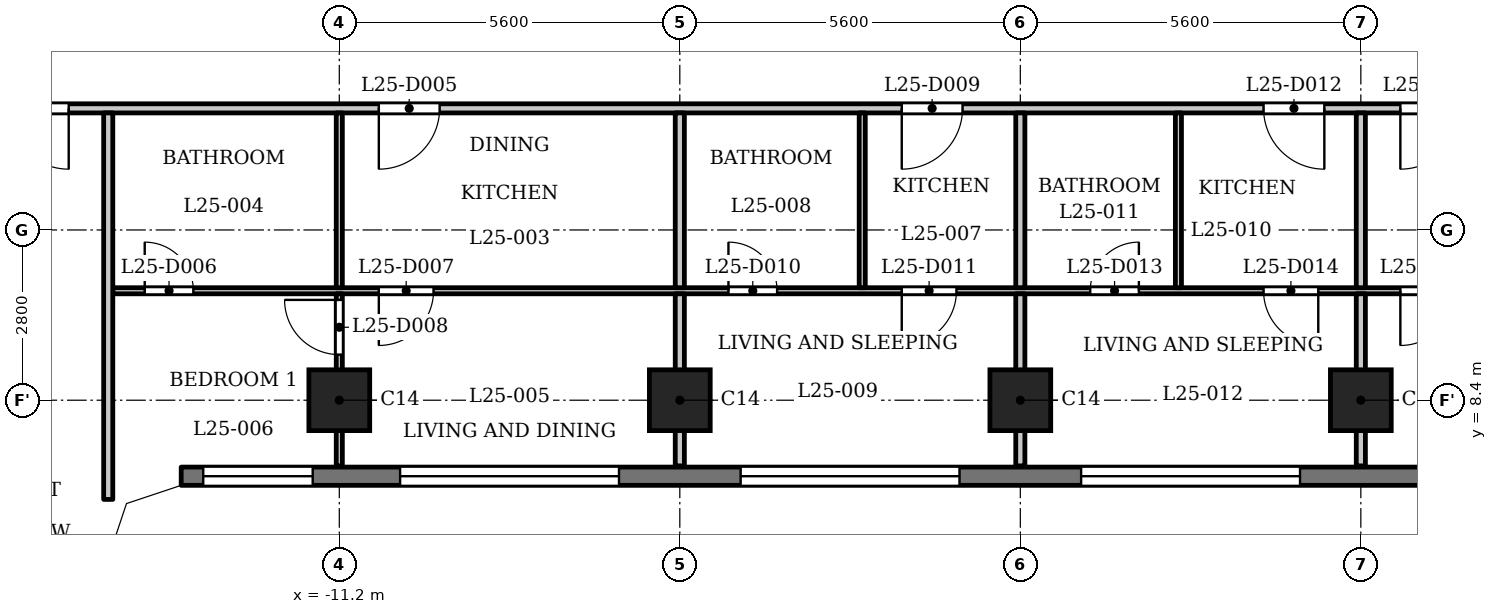
"""IFC4 building model, lengths in metres.
Left out: names, types, materials, properties, quantities, classifications, styles, units other than length and angle.
Written with IfcOpenShell. Run it as: python <this file> out.ifc"""

import sys

from ifc_helpers import new_model, si_unit, direction, frame, frame_2d, origin, origin_2d, place, context, subcontext, project, spatial, polyline, rectangle, outline, extrude, element, fill, save


model = new_model("IFC4")
c1 = context("Model", 3, precision=1e-05, world=origin(), true_north=direction((0.0, 1.0)))
c2 = subcontext(c1, "Body", "Model", "MODEL_VIEW")
j1 = project(units=[si_unit("LENGTHUNIT", "METRE"), si_unit("PLANEANGLEUNIT", "RADIAN")], contexts=[c1])
p1 = place(None, origin())
s1 = spatial("IfcSite", under=j1, at=p1, CompositionType="ELEMENT")
p2 = place(p1, origin())
s2 = spatial("IfcBuilding", under=s1, at=p2, CompositionType="ELEMENT")
p3 = place(p2, frame((0.0, 0.0, 100.8)))
s3 = spatial("IfcBuildingStorey", under=s2, at=p3, CompositionType="ELEMENT", Elevation=100.8)
for number, where, z_axis, x_axis in (
    (1, (-11.2, 8.4, 0.0), (0.0, 0.0, 1.0), (1.0, 0.0, 0.0)),
    (2, (-5.6, 8.4, 0.0), (0.0, 0.0, 1.0), (1.0, 0.0, 0.0)),
    (3, (0.0, 8.4, 0.0), (0.0, 0.0, 1.0), (1.0, 0.0, 0.0)),
    (4, (5.6, 8.4, 0.0), (0.0, 0.0, 1.0), (1.0, 0.0, 0.0)),
):
    element("IfcColumn", number, at=place(p3, frame(where, z_axis=z_axis, x_axis=x_axis)), inside=s3, PredefinedType="COLUMN", context=c2, shape_type="SweptSolid", body=[
        extrude(rectangle(XDim=1.0, YDim=1.0, at=origin_2d()), origin(), (0.0, 0.0, 1.0), 3.5),
    ])
p4 = place(p3, frame((-13.8, 7.15, 0.0), z_axis=(0.0, 0.0, 1.0), x_axis=(1.0, 0.0, 0.0)))
e5 = element("IfcWall", 5, at=p4, inside=s3, PredefinedType="SOLIDWALL", context=c2, shape_type="SweptSolid", body=[
    extrude(rectangle(XDim=27.6, YDim=0.3, at=frame_2d((13.8, 0.0))), origin(), (0.0, 0.0, 1.0), 3.2),
])
p5 = place(p4, frame((0.363, 0.0, 0.9)))
e6 = element("IfcOpeningElement", 6, at=p5, cuts=e5, PredefinedType="OPENING", context=c2, shape_type="SweptSolid", body=[
    extrude(rectangle(XDim=1.8, YDim=1.25, at=frame_2d((0.9, 0.625))), frame((0.0, 0.16, 0.0), z_axis=(0.0, -1.0, 0.0), x_axis=(1.0, 0.0, 0.0)), (0.0, 0.0, 1.0), 0.32),
])
p6 = place(p4, frame((3.6, 0.0, 1.2)))
e7 = element("IfcOpeningElement", 7, at=p6, cuts=e5, PredefinedType="OPENING", context=c2, shape_type="SweptSolid", body=[
    extrude(rectangle(XDim=3.6, YDim=0.95, at=frame_2d((1.8, 0.475))), frame((0.0, 0.16, 0.0), z_axis=(0.0, -1.0, 0.0), x_axis=(1.0, 0.0, 0.0)), (0.0, 0.0, 1.0), 0.32),
])
p7 = place(p4, frame((9.2, 0.0, 1.2)))
e8 = element("IfcOpeningElement", 8, at=p7, cuts=e5, PredefinedType="OPENING", context=c2, shape_type="SweptSolid", body=[
    extrude(rectangle(XDim=3.6, YDim=0.95, at=frame_2d((1.8, 0.475))), frame((0.0, 0.16, 0.0), z_axis=(0.0, -1.0, 0.0), x_axis=(1.0, 0.0, 0.0)), (0.0, 0.0, 1.0), 0.32),
])
p8 = place(p4, frame((14.8, 0.0, 1.2)))
e9 = element("IfcOpeningElement", 9, at=p8, cuts=e5, PredefinedType="OPENING", context=c2, shape_type="SweptSolid", body=[
    extrude(rectangle(XDim=3.6, YDim=0.95, at=frame_2d((1.8, 0.475))), frame((0.0, 0.16, 0.0), z_axis=(0.0, -1.0, 0.0), x_axis=(1.0, 0.0, 0.0)), (0.0, 0.0, 1.0), 0.32),
])
p9 = place(p4, frame((20.4, 0.0, 1.2)))
e10 = element("IfcOpeningElement", 10, at=p9, cuts=e5, PredefinedType="OPENING", context=c2, shape_type="SweptSolid", body=[
    extrude(rectangle(XDim=3.6, YDim=0.95, at=frame_2d((1.8, 0.475))), frame((0.0, 0.16, 0.0), z_axis=(0.0, -1.0, 0.0), x_axis=(1.0, 0.0, 0.0)), (0.0, 0.0, 1.0), 0.32),
])
p10 = place(p4, frame((25.438, 0.0, 0.9)))
e11 = element("IfcOpeningElement", 11, at=p10, cuts=e5, PredefinedType="OPENING", context=c2, shape_type="SweptSolid", body=[
    extrude(rectangle(XDim=1.8, YDim=1.25, at=frame_2d((0.9, 0.625))), frame((0.0, 0.16, 0.0), z_axis=(0.0, -1.0, 0.0), x_axis=(1.0, 0.0, 0.0)), (0.0, 0.0, 1.0), 0.32),
])
p11 = place(p3, frame((-14.925, 10.2, 0.0), z_axis=(0.0, 0.0, 1.0), x_axis=(1.0, 0.0, 0.0)))
e12 = element("IfcWall", 12, at=p11, inside=s3, PredefinedType="PARTITIONING", context=c2, shape_type="SweptSolid", body=[
    extrude(rectangle(XDim=29.85, YDim=0.1, at=frame_2d((14.925, 0.0))), origin(), (0.0, 0.0, 1.0), 3.2),
])
p12 = place(p11, frame((0.525, 0.0, 0.0)))
e13 = element("IfcOpeningElement", 13, at=p12, cuts=e12, PredefinedType="OPENING", context=c2, shape_type="SweptSolid", body=[
    extrude(rectangle(XDim=0.8, YDim=2.1, at=frame_2d((0.4, 1.05))), frame((0.0, 0.06, 0.0), z_axis=(0.0, -1.0, 0.0), x_axis=(1.0, 0.0, 0.0)), (0.0, 0.0, 1.0), 0.12),
])
p13 = place(p11, frame((4.375, 0.0, 0.0)))
e14 = element("IfcOpeningElement", 14, at=p13, cuts=e12, PredefinedType="OPENING", context=c2, shape_type="SweptSolid", body=[
    extrude(rectangle(XDim=0.9, YDim=2.1, at=frame_2d((0.45, 1.05))), frame((0.0, 0.06, 0.0), z_axis=(0.0, -1.0, 0.0), x_axis=(1.0, 0.0, 0.0)), (0.0, 0.0, 1.0), 0.12),
])
p14 = place(p11, frame((10.125, 0.0, 0.0)))
e15 = element("IfcOpeningElement", 15, at=p14, cuts=e12, PredefinedType="OPENING", context=c2, shape_type="SweptSolid", body=[
    extrude(rectangle(XDim=0.8, YDim=2.1, at=frame_2d((0.4, 1.05))), frame((0.0, 0.06, 0.0), z_axis=(0.0, -1.0, 0.0), x_axis=(1.0, 0.0, 0.0)), (0.0, 0.0, 1.0), 0.12),
])
p15 = place(p11, frame((12.975, 0.0, 0.0)))
e16 = element("IfcOpeningElement", 16, at=p15, cuts=e12, PredefinedType="OPENING", context=c2, shape_type="SweptSolid", body=[
    extrude(rectangle(XDim=0.9, YDim=2.1, at=frame_2d((0.45, 1.05))), frame((0.0, 0.06, 0.0), z_axis=(0.0, -1.0, 0.0), x_axis=(1.0, 0.0, 0.0)), (0.0, 0.0, 1.0), 0.12),
])
p16 = place(p11, frame((16.075, 0.0, 0.0)))
e17 = element("IfcOpeningElement", 17, at=p16, cuts=e12, PredefinedType="OPENING", context=c2, shape_type="SweptSolid", body=[
    extrude(rectangle(XDim=0.8, YDim=2.1, at=frame_2d((0.4, 1.05))), frame((0.0, 0.06, 0.0), z_axis=(0.0, -1.0, 0.0), x_axis=(1.0, 0.0, 0.0)), (0.0, 0.0, 1.0), 0.12),
])
p17 = place(p11, frame((18.925, 0.0, 0.0)))
e18 = element("IfcOpeningElement", 18, at=p17, cuts=e12, PredefinedType="OPENING", context=c2, shape_type="SweptSolid", body=[
    extrude(rectangle(XDim=0.9, YDim=2.1, at=frame_2d((0.45, 1.05))), frame((0.0, 0.06, 0.0), z_axis=(0.0, -1.0, 0.0), x_axis=(1.0, 0.0, 0.0)), (0.0, 0.0, 1.0), 0.12),
])
p18 = place(p11, frame((26.975, 0.0, 0.0)))
e19 = element("IfcOpeningElement", 19, at=p18, cuts=e12, PredefinedType="OPENING", context=c2, shape_type="SweptSolid", body=[
    extrude(rectangle(XDim=0.8, YDim=2.1, at=frame_2d((0.4, 1.05))), frame((0.0, 0.06, 0.0), z_axis=(0.0, -1.0, 0.0), x_axis=(1.0, 0.0, 0.0)), (0.0, 0.0, 1.0), 0.12),
])
p19 = place(p11, frame((21.175, 0.0, 0.0)))
e20 = element("IfcOpeningElement", 20, at=p19, cuts=e12, PredefinedType="OPENING", context=c2, shape_type="SweptSolid", body=[
    extrude(rectangle(XDim=0.9, YDim=2.1, at=frame_2d((0.45, 1.05))), frame((0.0, 0.06, 0.0), z_axis=(0.0, -1.0, 0.0), x_axis=(1.0, 0.0, 0.0)), (0.0, 0.0, 1.0), 0.12),
])
p20 = place(p3, frame((-17.4, 13.2, 0.0), z_axis=(0.0, 0.0, 1.0), x_axis=(1.0, 0.0, 0.0)))
e21 = element("IfcWall", 21, at=p20, inside=s3, PredefinedType="PARTITIONING", context=c2, shape_type="SweptSolid", body=[
    extrude(rectangle(XDim=34.8, YDim=0.15, at=frame_2d((17.4, 0.0))), origin(), (0.0, 0.0, 1.0), 3.2),
])
p21 = place(p20, frame((0.75, 0.0, 0.0)))
e22 = element("IfcOpeningElement", 22, at=p21, cuts=e21, PredefinedType="OPENING", context=c2, shape_type="SweptSolid", body=[
    extrude(rectangle(XDim=1.0, YDim=2.1, at=frame_2d((0.5, 1.05))), frame((0.0, 0.085, 0.0), z_axis=(0.0, -1.0, 0.0), x_axis=(1.0, 0.0, 0.0)), (0.0, 0.0, 1.0), 0.17),
])
p22 = place(p20, frame((33.15, 0.0, 0.0)))
e23 = element("IfcOpeningElement", 23, at=p22, cuts=e21, PredefinedType="OPENING", context=c2, shape_type="SweptSolid", body=[
    extrude(rectangle(XDim=1.0, YDim=2.1, at=frame_2d((0.5, 1.05))), frame((0.0, 0.085, 0.0), z_axis=(0.0, -1.0, 0.0), x_axis=(1.0, 0.0, 0.0)), (0.0, 0.0, 1.0), 0.17),
])
p23 = place(p20, frame((6.85, 0.0, 0.0)))
e24 = element("IfcOpeningElement", 24, at=p23, cuts=e21, PredefinedType="OPENING", context=c2, shape_type="SweptSolid", body=[
    extrude(rectangle(XDim=1.0, YDim=2.1, at=frame_2d((0.5, 1.05))), frame((0.0, 0.085, 0.0), z_axis=(0.0, -1.0, 0.0), x_axis=(1.0, 0.0, 0.0)), (0.0, 0.0, 1.0), 0.17),
])
p24 = place(p20, frame((15.45, 0.0, 0.0)))
e25 = element("IfcOpeningElement", 25, at=p24, cuts=e21, PredefinedType="OPENING", context=c2, shape_type="SweptSolid", body=[
    extrude(rectangle(XDim=1.0, YDim=2.1, at=frame_2d((0.5, 1.05))), frame((0.0, 0.085, 0.0), z_axis=(0.0, -1.0, 0.0), x_axis=(1.0, 0.0, 0.0)), (0.0, 0.0, 1.0), 0.17),
])
p25 = place(p20, frame((21.4, 0.0, 0.0)))
e26 = element("IfcOpeningElement", 26, at=p25, cuts=e21, PredefinedType="OPENING", context=c2, shape_type="SweptSolid", body=[
    extrude(rectangle(XDim=1.0, YDim=2.1, at=frame_2d((0.5, 1.05))), frame((0.0, 0.085, 0.0), z_axis=(0.0, -1.0, 0.0), x_axis=(1.0, 0.0, 0.0)), (0.0, 0.0, 1.0), 0.17),
])
p26 = place(p20, frame((23.65, 0.0, 0.0)))
e27 = element("IfcOpeningElement", 27, at=p26, cuts=e21, PredefinedType="OPENING", context=c2, shape_type="SweptSolid", body=[
    extrude(rectangle(XDim=1.0, YDim=2.1, at=frame_2d((0.5, 1.05))), frame((0.0, 0.085, 0.0), z_axis=(0.0, -1.0, 0.0), x_axis=(1.0, 0.0, 0.0)), (0.0, 0.0, 1.0), 0.17),
])
p27 = place(p3, frame((-15.0, 6.769, 0.0), z_axis=(0.0, 0.0, 1.0), x_axis=(0.0, 1.0, 0.0)))
e28 = element("IfcWall", 28, at=p27, inside=s3, PredefinedType="PARTITIONING", context=c2, shape_type="SweptSolid", body=[
    extrude(rectangle(XDim=6.356, YDim=0.15, at=frame_2d((3.178, 0.0))), origin(), (0.0, 0.0, 1.0), 3.2),
])
p28 = place(p3, frame((-11.2, 7.32, 0.0), z_axis=(0.0, 0.0, 1.0), x_axis=(0.0, 1.0, 0.0)))
e29 = element("IfcWall", 29, at=p28, inside=s3, PredefinedType="PARTITIONING", context=c2, shape_type="SweptSolid", body=[
    extrude(rectangle(XDim=2.83, YDim=0.1, at=frame_2d((1.415, 0.0))), origin(), (0.0, 0.0, 1.0), 3.2),
])
p29 = place(p28, frame((1.83, 0.0, 0.0)))
e30 = element("IfcOpeningElement", 30, at=p29, cuts=e29, PredefinedType="OPENING", context=c2, shape_type="SweptSolid", body=[
    extrude(rectangle(XDim=0.9, YDim=2.1, at=frame_2d((0.45, 1.05))), frame((0.0, 0.06, 0.0), z_axis=(0.0, -1.0, 0.0), x_axis=(1.0, 0.0, 0.0)), (0.0, 0.0, 1.0), 0.12),
])
p30 = place(p3, frame((-11.2, 10.25, 0.0), z_axis=(0.0, 0.0, 1.0), x_axis=(0.0, 1.0, 0.0)))
e31 = element("IfcWall", 31, at=p30, inside=s3, PredefinedType="PARTITIONING", context=c2, shape_type="SweptSolid", body=[
    extrude(rectangle(XDim=2.875, YDim=0.1, at=frame_2d((1.438, 0.0))), origin(), (0.0, 0.0, 1.0), 3.2),
])
p31 = place(p3, frame((-5.6, 7.32, 0.0), z_axis=(0.0, 0.0, 1.0), x_axis=(0.0, 1.0, 0.0)))
e32 = element("IfcWall", 32, at=p31, inside=s3, PredefinedType="PARTITIONING", context=c2, shape_type="SweptSolid", body=[
    extrude(rectangle(XDim=2.83, YDim=0.15, at=frame_2d((1.415, 0.0))), origin(), (0.0, 0.0, 1.0), 3.2),
])
p32 = place(p3, frame((-5.6, 10.25, 0.0), z_axis=(0.0, 0.0, 1.0), x_axis=(0.0, 1.0, 0.0)))
e33 = element("IfcWall", 33, at=p32, inside=s3, PredefinedType="PARTITIONING", context=c2, shape_type="SweptSolid", body=[
    extrude(rectangle(XDim=2.875, YDim=0.15, at=frame_2d((1.438, 0.0))), origin(), (0.0, 0.0, 1.0), 3.2),
])
p33 = place(p3, frame((-2.6, 10.25, 0.0), z_axis=(0.0, 0.0, 1.0), x_axis=(0.0, 1.0, 0.0)))
e34 = element("IfcWall", 34, at=p33, inside=s3, PredefinedType="PARTITIONING", context=c2, shape_type="SweptSolid", body=[
    extrude(rectangle(XDim=2.875, YDim=0.1, at=frame_2d((1.438, 0.0))), origin(), (0.0, 0.0, 1.0), 3.2),
])
p34 = place(p3, frame((0.0, 7.32, 0.0), z_axis=(0.0, 0.0, 1.0), x_axis=(0.0, 1.0, 0.0)))
e35 = element("IfcWall", 35, at=p34, inside=s3, PredefinedType="PARTITIONING", context=c2, shape_type="SweptSolid", body=[
    extrude(rectangle(XDim=2.83, YDim=0.15, at=frame_2d((1.415, 0.0))), origin(), (0.0, 0.0, 1.0), 3.2),
])
p35 = place(p3, frame((0.0, 10.25, 0.0), z_axis=(0.0, 0.0, 1.0), x_axis=(0.0, 1.0, 0.0)))
e36 = element("IfcWall", 36, at=p35, inside=s3, PredefinedType="PARTITIONING", context=c2, shape_type="SweptSolid", body=[
    extrude(rectangle(XDim=2.875, YDim=0.15, at=frame_2d((1.438, 0.0))), origin(), (0.0, 0.0, 1.0), 3.2),
])
p36 = place(p3, frame((2.6, 10.25, 0.0), z_axis=(0.0, 0.0, 1.0), x_axis=(0.0, 1.0, 0.0)))
e37 = element("IfcWall", 37, at=p36, inside=s3, PredefinedType="PARTITIONING", context=c2, shape_type="SweptSolid", body=[
    extrude(rectangle(XDim=2.875, YDim=0.1, at=frame_2d((1.438, 0.0))), origin(), (0.0, 0.0, 1.0), 3.2),
])
p37 = place(p3, frame((5.6, 7.32, 0.0), z_axis=(0.0, 0.0, 1.0), x_axis=(0.0, 1.0, 0.0)))
e38 = element("IfcWall", 38, at=p37, inside=s3, PredefinedType="PARTITIONING", context=c2, shape_type="SweptSolid", body=[
    extrude(rectangle(XDim=2.83, YDim=0.15, at=frame_2d((1.415, 0.0))), origin(), (0.0, 0.0, 1.0), 3.2),
])
p38 = place(p3, frame((5.6, 10.25, 0.0), z_axis=(0.0, 0.0, 1.0), x_axis=(0.0, 1.0, 0.0)))
e39 = element("IfcWall", 39, at=p38, inside=s3, PredefinedType="PARTITIONING", context=c2, shape_type="SweptSolid", body=[
    extrude(rectangle(XDim=2.875, YDim=0.15, at=frame_2d((1.438, 0.0))), origin(), (0.0, 0.0, 1.0), 3.2),
])
p39 = place(p3, origin())
e40 = element("IfcWall", 40, at=p39, inside=s3, PredefinedType="SOLIDWALL", context=c2, shape_type="SweptSolid", body=[
    extrude(outline(polyline([(-13.849, 7.3), (-14.937, 6.937), (-15.3, 5.849), (-15.3, 5.8), (-15.0, 5.8), (-14.7, 6.7), (-13.8, 7.0), (-13.8, 7.3), (-13.849, 7.3)])), origin(), (0.0, 0.0, 1.0), 3.2),
])
p40 = place(p21, origin())
e41 = element("IfcDoor", 41, at=p40, inside=s3, OperationType="SINGLE_SWING_RIGHT", PredefinedType="DOOR", context=c2, shape_type="SweptSolid", body=[
    extrude(rectangle(XDim=1.0, YDim=2.1, at=frame_2d((0.5, 1.05))), frame((0.0, 0.025, 0.0), z_axis=(0.0, -1.0, 0.0), x_axis=(1.0, 0.0, 0.0)), (0.0, 0.0, 1.0), 0.05),
])
fill(e22, e41)
p41 = place(p23, origin())
e42 = element("IfcDoor", 42, at=p41, inside=s3, OperationType="SINGLE_SWING_LEFT", PredefinedType="DOOR", context=c2, shape_type="SweptSolid", body=[
    extrude(rectangle(XDim=1.0, YDim=2.1, at=frame_2d((0.5, 1.05))), frame((0.0, 0.025, 0.0), z_axis=(0.0, -1.0, 0.0), x_axis=(1.0, 0.0, 0.0)), (0.0, 0.0, 1.0), 0.05),
])
fill(e24, e42)
p42 = place(p12, origin())
e43 = element("IfcDoor", 43, at=p42, inside=s3, OperationType="SINGLE_SWING_RIGHT", PredefinedType="DOOR", context=c2, shape_type="SweptSolid", body=[
    extrude(rectangle(XDim=0.8, YDim=2.1, at=frame_2d((0.4, 1.05))), frame((0.0, 0.025, 0.0), z_axis=(0.0, -1.0, 0.0), x_axis=(1.0, 0.0, 0.0)), (0.0, 0.0, 1.0), 0.05),
])
fill(e13, e43)
p43 = place(p13, origin())
e44 = element("IfcDoor", 44, at=p43, inside=s3, OperationType="SINGLE_SWING_LEFT", PredefinedType="DOOR", context=c2, shape_type="SweptSolid", body=[
    extrude(rectangle(XDim=0.9, YDim=2.1, at=frame_2d((0.45, 1.05))), frame((0.0, 0.025, 0.0), z_axis=(0.0, -1.0, 0.0), x_axis=(1.0, 0.0, 0.0)), (0.0, 0.0, 1.0), 0.05),
])
fill(e14, e44)
p44 = place(p29, origin())
e45 = element("IfcDoor", 45, at=p44, inside=s3, OperationType="SINGLE_SWING_LEFT", PredefinedType="DOOR", context=c2, shape_type="SweptSolid", body=[
    extrude(rectangle(XDim=0.9, YDim=2.1, at=frame_2d((0.45, 1.05))), frame((0.0, 0.025, 0.0), z_axis=(0.0, -1.0, 0.0), x_axis=(1.0, 0.0, 0.0)), (0.0, 0.0, 1.0), 0.05),
])
fill(e30, e45)
p45 = place(p24, origin())
e46 = element("IfcDoor", 46, at=p45, inside=s3, OperationType="SINGLE_SWING_LEFT", PredefinedType="DOOR", context=c2, shape_type="SweptSolid", body=[
    extrude(rectangle(XDim=1.0, YDim=2.1, at=frame_2d((0.5, 1.05))), frame((0.0, 0.025, 0.0), z_axis=(0.0, -1.0, 0.0), x_axis=(1.0, 0.0, 0.0)), (0.0, 0.0, 1.0), 0.05),
])
fill(e25, e46)
p46 = place(p14, origin())
e47 = element("IfcDoor", 47, at=p46, inside=s3, OperationType="SINGLE_SWING_RIGHT", PredefinedType="DOOR", context=c2, shape_type="SweptSolid", body=[
    extrude(rectangle(XDim=0.8, YDim=2.1, at=frame_2d((0.4, 1.05))), frame((0.0, 0.025, 0.0), z_axis=(0.0, -1.0, 0.0), x_axis=(1.0, 0.0, 0.0)), (0.0, 0.0, 1.0), 0.05),
])
fill(e15, e47)
p47 = place(p15, origin())
e48 = element("IfcDoor", 48, at=p47, inside=s3, OperationType="SINGLE_SWING_LEFT", PredefinedType="DOOR", context=c2, shape_type="SweptSolid", body=[
    extrude(rectangle(XDim=0.9, YDim=2.1, at=frame_2d((0.45, 1.05))), frame((0.0, 0.025, 0.0), z_axis=(0.0, -1.0, 0.0), x_axis=(1.0, 0.0, 0.0)), (0.0, 0.0, 1.0), 0.05),
])
fill(e16, e48)
p48 = place(p25, origin())
e49 = element("IfcDoor", 49, at=p48, inside=s3, OperationType="SINGLE_SWING_RIGHT", PredefinedType="DOOR", context=c2, shape_type="SweptSolid", body=[
    extrude(rectangle(XDim=1.0, YDim=2.1, at=frame_2d((0.5, 1.05))), frame((0.0, 0.025, 0.0), z_axis=(0.0, -1.0, 0.0), x_axis=(1.0, 0.0, 0.0)), (0.0, 0.0, 1.0), 0.05),
])
fill(e26, e49)
p49 = place(p16, origin())
e50 = element("IfcDoor", 50, at=p49, inside=s3, OperationType="SINGLE_SWING_LEFT", PredefinedType="DOOR", context=c2, shape_type="SweptSolid", body=[
    extrude(rectangle(XDim=0.8, YDim=2.1, at=frame_2d((0.4, 1.05))), frame((0.0, 0.025, 0.0), z_axis=(0.0, -1.0, 0.0), x_axis=(1.0, 0.0, 0.0)), (0.0, 0.0, 1.0), 0.05),
])
fill(e17, e50)
p50 = place(p17, origin())
e51 = element("IfcDoor", 51, at=p50, inside=s3, OperationType="SINGLE_SWING_RIGHT", PredefinedType="DOOR", context=c2, shape_type="SweptSolid", body=[
    extrude(rectangle(XDim=0.9, YDim=2.1, at=frame_2d((0.45, 1.05))), frame((0.0, 0.025, 0.0), z_axis=(0.0, -1.0, 0.0), x_axis=(1.0, 0.0, 0.0)), (0.0, 0.0, 1.0), 0.05),
])
fill(e18, e51)
p51 = place(p26, origin())
e52 = element("IfcDoor", 52, at=p51, inside=s3, OperationType="SINGLE_SWING_LEFT", PredefinedType="DOOR", context=c2, shape_type="SweptSolid", body=[
    extrude(rectangle(XDim=1.0, YDim=2.1, at=frame_2d((0.5, 1.05))), frame((0.0, 0.025, 0.0), z_axis=(0.0, -1.0, 0.0), x_axis=(1.0, 0.0, 0.0)), (0.0, 0.0, 1.0), 0.05),
])
fill(e27, e52)
p52 = place(p19, origin())
e53 = element("IfcDoor", 53, at=p52, inside=s3, OperationType="SINGLE_SWING_LEFT", PredefinedType="DOOR", context=c2, shape_type="SweptSolid", body=[
    extrude(rectangle(XDim=0.9, YDim=2.1, at=frame_2d((0.45, 1.05))), frame((0.0, 0.025, 0.0), z_axis=(0.0, -1.0, 0.0), x_axis=(1.0, 0.0, 0.0)), (0.0, 0.0, 1.0), 0.05),
])
fill(e20, e53)
p53 = place(p5, origin())
e54 = element("IfcWindow", 54, at=p53, inside=s3, PartitioningType="SINGLE_PANEL", PredefinedType="WINDOW", context=c2, shape_type="SweptSolid", body=[
    extrude(rectangle(XDim=1.8, YDim=1.25, at=frame_2d((0.9, 0.625))), frame((0.0, 0.03, 0.0), z_axis=(0.0, -1.0, 0.0), x_axis=(1.0, 0.0, 0.0)), (0.0, 0.0, 1.0), 0.06),
])
fill(e6, e54)
p54 = place(p6, origin())
e55 = element("IfcWindow", 55, at=p54, inside=s3, PartitioningType="SINGLE_PANEL", PredefinedType="WINDOW", context=c2, shape_type="SweptSolid", body=[
    extrude(rectangle(XDim=3.6, YDim=0.95, at=frame_2d((1.8, 0.475))), frame((0.0, 0.03, 0.0), z_axis=(0.0, -1.0, 0.0), x_axis=(1.0, 0.0, 0.0)), (0.0, 0.0, 1.0), 0.06),
])
fill(e7, e55)
p55 = place(p7, origin())
e56 = element("IfcWindow", 56, at=p55, inside=s3, PartitioningType="SINGLE_PANEL", PredefinedType="WINDOW", context=c2, shape_type="SweptSolid", body=[
    extrude(rectangle(XDim=3.6, YDim=0.95, at=frame_2d((1.8, 0.475))), frame((0.0, 0.03, 0.0), z_axis=(0.0, -1.0, 0.0), x_axis=(1.0, 0.0, 0.0)), (0.0, 0.0, 1.0), 0.06),
])
fill(e8, e56)
p56 = place(p8, origin())
e57 = element("IfcWindow", 57, at=p56, inside=s3, PartitioningType="SINGLE_PANEL", PredefinedType="WINDOW", context=c2, shape_type="SweptSolid", body=[
    extrude(rectangle(XDim=3.6, YDim=0.95, at=frame_2d((1.8, 0.475))), frame((0.0, 0.03, 0.0), z_axis=(0.0, -1.0, 0.0), x_axis=(1.0, 0.0, 0.0)), (0.0, 0.0, 1.0), 0.06),
])
fill(e9, e57)
save(model, sys.argv[1])
